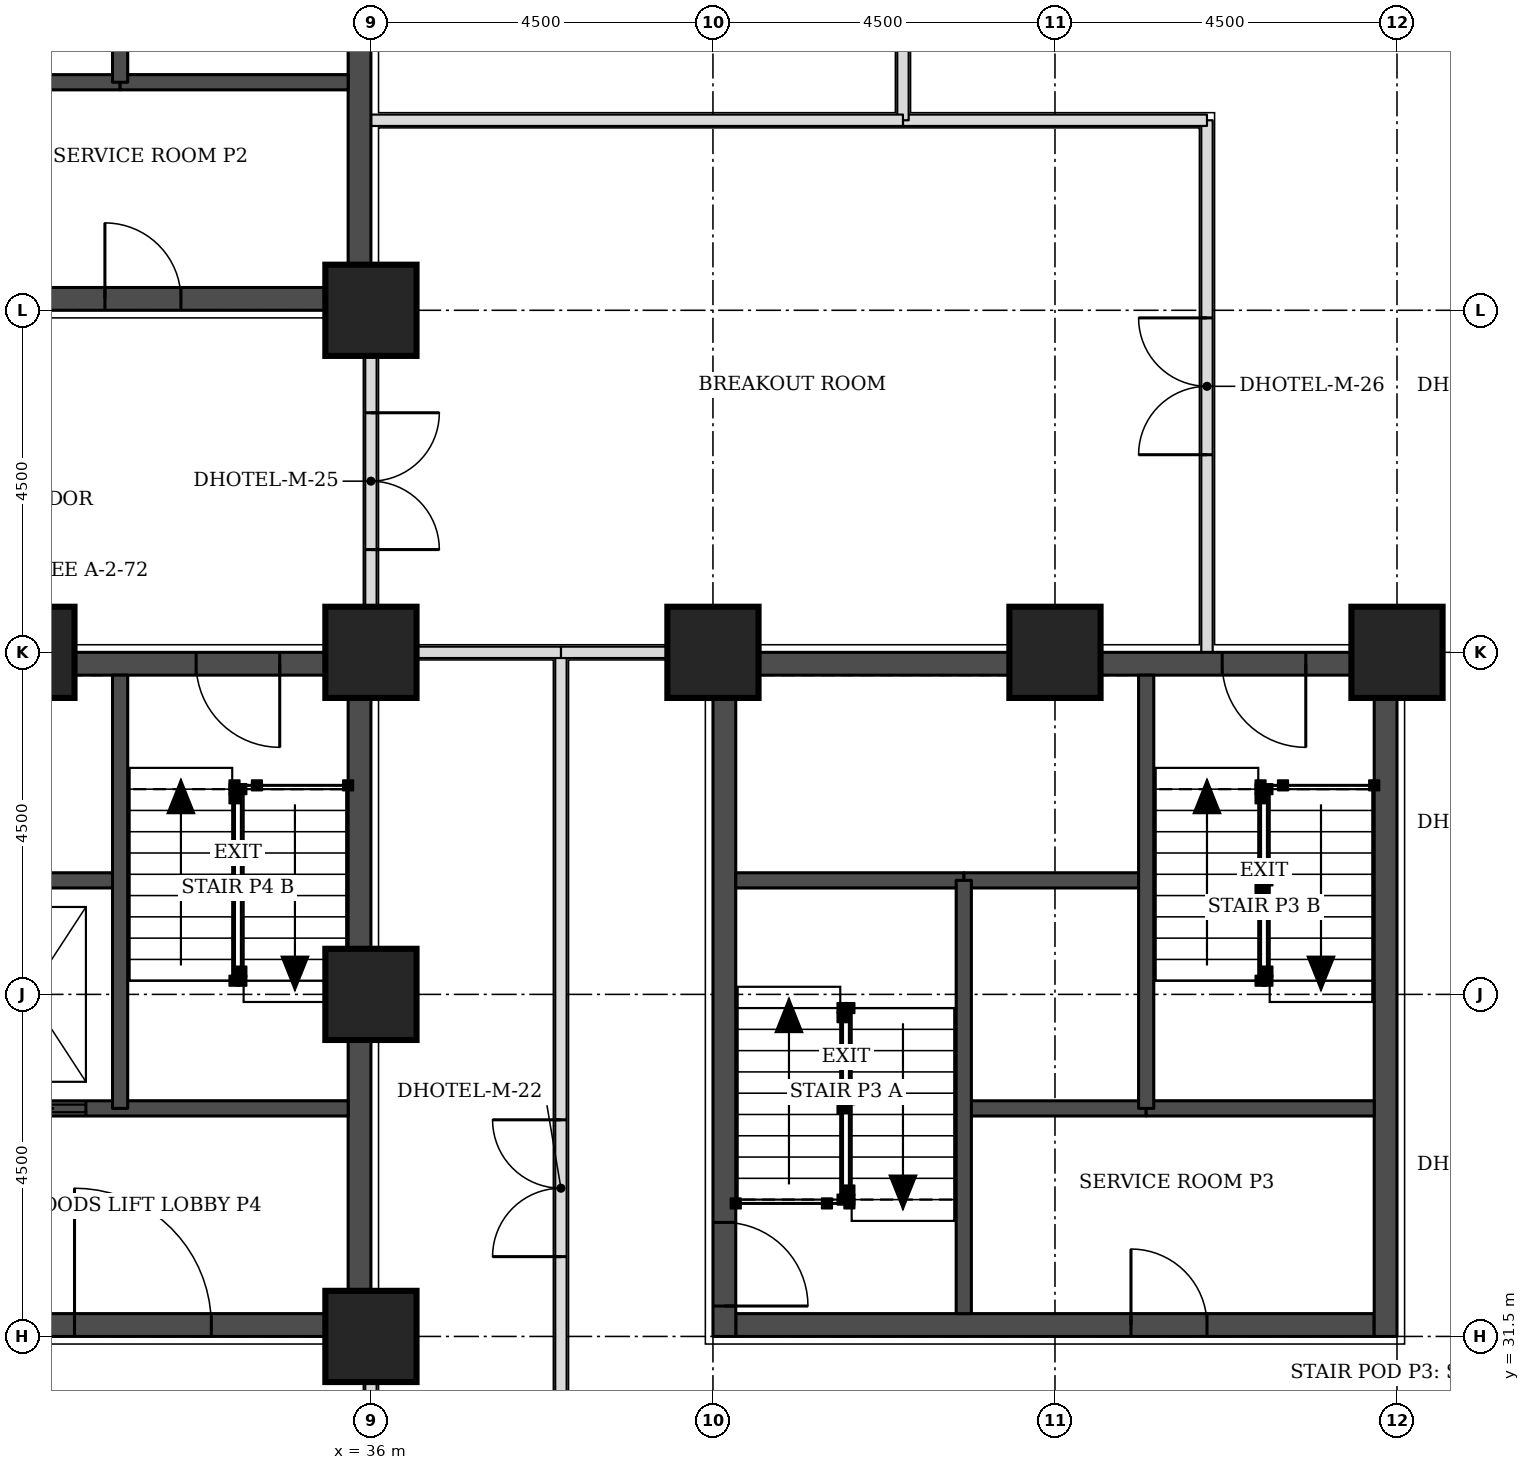
"""IFC4 building model, lengths in metres.
Left out: names, types, materials, properties, quantities, classifications, styles, units other than length and angle.
Written with IfcOpenShell. Run it as: python <this file> out.ifc"""

import sys

from ifc_helpers import new_model, si_unit, direction, frame, frame_2d, origin, origin_2d, place, context, subcontext, project, spatial, rectangle, extrude, element, fill, save


model = new_model("IFC4")
c1 = context("Model", 3, precision=1e-05, world=origin(), true_north=direction((0.0, 1.0)))
c2 = subcontext(c1, "Body", "Model", "MODEL_VIEW")
j1 = project(units=[si_unit("LENGTHUNIT", "METRE"), si_unit("PLANEANGLEUNIT", "RADIAN")], contexts=[c1])
p1 = place(None, origin())
s1 = spatial("IfcSite", under=j1, at=p1, CompositionType="ELEMENT")
p2 = place(p1, origin())
s2 = spatial("IfcBuilding", under=s1, at=p2, CompositionType="ELEMENT")
p3 = place(p2, frame((0.0, 0.0, 23.1)))
s3 = spatial("IfcBuildingStorey", under=s2, at=p3, CompositionType="ELEMENT", Elevation=23.1)
for number, where, z_axis, x_axis in (
    (1, (36.0, 31.5, 0.0), (0.0, 0.0, 1.0), (1.0, 0.0, 0.0)),
    (2, (36.0, 36.0, 0.0), (0.0, 0.0, 1.0), (1.0, 0.0, 0.0)),
    (3, (31.5, 40.5, 0.0), (0.0, 0.0, 1.0), (1.0, 0.0, 0.0)),
    (4, (36.0, 40.5, 0.0), (0.0, 0.0, 1.0), (1.0, 0.0, 0.0)),
    (5, (40.5, 40.5, 0.0), (0.0, 0.0, 1.0), (1.0, 0.0, 0.0)),
    (6, (45.0, 40.5, 0.0), (0.0, 0.0, 1.0), (1.0, 0.0, 0.0)),
    (7, (49.5, 40.5, 0.0), (0.0, 0.0, 1.0), (1.0, 0.0, 0.0)),
    (8, (36.0, 45.0, 0.0), (0.0, 0.0, 1.0), (1.0, 0.0, 0.0)),
):
    element("IfcColumn", number, at=place(p3, frame(where, z_axis=z_axis, x_axis=x_axis)), inside=s3, PredefinedType="COLUMN", context=c2, shape_type="SweptSolid", body=[
        extrude(rectangle(XDim=1.2, YDim=1.2, at=origin_2d()), origin(), (0.0, 0.0, 1.0), 3.3),
    ])
p4 = place(p3, frame((27.3, 45.15, 0.0), z_axis=(0.0, 0.0, 1.0), x_axis=(1.0, 0.0, 0.0)))
e9 = element("IfcWall", 9, at=p4, inside=s3, PredefinedType="SHEAR", context=c2, shape_type="SweptSolid", body=[
    extrude(rectangle(XDim=8.4, YDim=0.3, at=frame_2d((4.2, 0.0))), origin(), (0.0, 0.0, 1.0), 3.3),
])
p5 = place(p4, frame((5.2, 0.0, 0.0)))
e10 = element("IfcOpeningElement", 10, at=p5, cuts=e9, PredefinedType="OPENING", context=c2, shape_type="SweptSolid", body=[
    extrude(rectangle(XDim=1.0, YDim=2.1, at=frame_2d((0.5, 1.05))), frame((0.0, 0.16, 0.0), z_axis=(0.0, -1.0, 0.0), x_axis=(1.0, 0.0, 0.0)), (0.0, 0.0, 1.0), 0.32),
])
p6 = place(p3, frame((35.85, 45.0, 0.0), z_axis=(0.0, 0.0, 1.0), x_axis=(0.0, 1.0, 0.0)))
e11 = element("IfcWall", 11, at=p6, inside=s3, PredefinedType="SHEAR", context=c2, shape_type="SweptSolid", body=[
    extrude(rectangle(XDim=9.0, YDim=0.3, at=frame_2d((4.5, 0.0))), origin(), (0.0, 0.0, 1.0), 3.3),
])
p7 = place(p3, frame((40.8, 31.65, 0.0), z_axis=(0.0, 0.0, 1.0), x_axis=(1.0, 0.0, 0.0)))
e12 = element("IfcWall", 12, at=p7, inside=s3, PredefinedType="SHEAR", context=c2, shape_type="SweptSolid", body=[
    extrude(rectangle(XDim=8.4, YDim=0.3, at=frame_2d((4.2, 0.0))), origin(), (0.0, 0.0, 1.0), 3.3),
])
p8 = place(p7, frame((5.2, 0.0, 0.0)))
e13 = element("IfcOpeningElement", 13, at=p8, cuts=e12, PredefinedType="OPENING", context=c2, shape_type="SweptSolid", body=[
    extrude(rectangle(XDim=1.0, YDim=2.1, at=frame_2d((0.5, 1.05))), frame((0.0, 0.16, 0.0), z_axis=(0.0, -1.0, 0.0), x_axis=(1.0, 0.0, 0.0)), (0.0, 0.0, 1.0), 0.32),
])
p9 = place(p3, frame((40.8, 40.35, 0.0), z_axis=(0.0, 0.0, 1.0), x_axis=(1.0, 0.0, 0.0)))
e14 = element("IfcWall", 14, at=p9, inside=s3, PredefinedType="SHEAR", context=c2, shape_type="SweptSolid", body=[
    extrude(rectangle(XDim=8.4, YDim=0.3, at=frame_2d((4.2, 0.0))), origin(), (0.0, 0.0, 1.0), 3.3),
])
p10 = place(p9, frame((6.4, 0.0, 0.0)))
e15 = element("IfcOpeningElement", 15, at=p10, cuts=e14, PredefinedType="OPENING", context=c2, shape_type="SweptSolid", body=[
    extrude(rectangle(XDim=1.1, YDim=2.1, at=frame_2d((0.55, 1.05))), frame((0.0, 0.16, 0.0), z_axis=(0.0, -1.0, 0.0), x_axis=(1.0, 0.0, 0.0)), (0.0, 0.0, 1.0), 0.32),
])
p11 = place(p3, frame((40.65, 31.5, 0.0), z_axis=(0.0, 0.0, 1.0), x_axis=(0.0, 1.0, 0.0)))
e16 = element("IfcWall", 16, at=p11, inside=s3, PredefinedType="SHEAR", context=c2, shape_type="SweptSolid", body=[
    extrude(rectangle(XDim=9.0, YDim=0.3, at=frame_2d((4.5, 0.0))), origin(), (0.0, 0.0, 1.0), 3.3),
])
p12 = place(p11, frame((0.4, 0.0, 0.0)))
e17 = element("IfcOpeningElement", 17, at=p12, cuts=e16, PredefinedType="OPENING", context=c2, shape_type="SweptSolid", body=[
    extrude(rectangle(XDim=1.1, YDim=2.1, at=frame_2d((0.55, 1.05))), frame((0.0, 0.16, 0.0), z_axis=(0.0, -1.0, 0.0), x_axis=(1.0, 0.0, 0.0)), (0.0, 0.0, 1.0), 0.32),
])
p13 = place(p3, frame((49.35, 31.5, 0.0), z_axis=(0.0, 0.0, 1.0), x_axis=(0.0, 1.0, 0.0)))
e18 = element("IfcWall", 18, at=p13, inside=s3, PredefinedType="SHEAR", context=c2, shape_type="SweptSolid", body=[
    extrude(rectangle(XDim=9.0, YDim=0.3, at=frame_2d((4.5, 0.0))), origin(), (0.0, 0.0, 1.0), 3.3),
])
p14 = place(p3, frame((27.3, 31.65, 0.0), z_axis=(0.0, 0.0, 1.0), x_axis=(1.0, 0.0, 0.0)))
e19 = element("IfcWall", 19, at=p14, inside=s3, PredefinedType="SHEAR", context=c2, shape_type="SweptSolid", body=[
    extrude(rectangle(XDim=8.4, YDim=0.3, at=frame_2d((4.2, 0.0))), origin(), (0.0, 0.0, 1.0), 3.3),
])
p15 = place(p14, frame((4.8, 0.0, 0.0)))
e20 = element("IfcOpeningElement", 20, at=p15, cuts=e19, PredefinedType="OPENING", context=c2, shape_type="SweptSolid", body=[
    extrude(rectangle(XDim=1.8, YDim=2.1, at=frame_2d((0.9, 1.05))), frame((0.0, 0.16, 0.0), z_axis=(0.0, -1.0, 0.0), x_axis=(1.0, 0.0, 0.0)), (0.0, 0.0, 1.0), 0.32),
])
p16 = place(p3, frame((27.3, 40.35, 0.0), z_axis=(0.0, 0.0, 1.0), x_axis=(1.0, 0.0, 0.0)))
e21 = element("IfcWall", 21, at=p16, inside=s3, PredefinedType="SHEAR", context=c2, shape_type="SweptSolid", body=[
    extrude(rectangle(XDim=8.4, YDim=0.3, at=frame_2d((4.2, 0.0))), origin(), (0.0, 0.0, 1.0), 3.3),
])
p17 = place(p16, frame((6.4, 0.0, 0.0)))
e22 = element("IfcOpeningElement", 22, at=p17, cuts=e21, PredefinedType="OPENING", context=c2, shape_type="SweptSolid", body=[
    extrude(rectangle(XDim=1.1, YDim=2.1, at=frame_2d((0.55, 1.05))), frame((0.0, 0.16, 0.0), z_axis=(0.0, -1.0, 0.0), x_axis=(1.0, 0.0, 0.0)), (0.0, 0.0, 1.0), 0.32),
])
p18 = place(p3, frame((35.85, 31.5, 0.0), z_axis=(0.0, 0.0, 1.0), x_axis=(0.0, 1.0, 0.0)))
e23 = element("IfcWall", 23, at=p18, inside=s3, PredefinedType="SHEAR", context=c2, shape_type="SweptSolid", body=[
    extrude(rectangle(XDim=9.0, YDim=0.3, at=frame_2d((4.5, 0.0))), origin(), (0.0, 0.0, 1.0), 3.3),
])
p19 = place(p3, frame((38.5, 26.4, 0.0), z_axis=(0.0, 0.0, 1.0), x_axis=(0.0, 1.0, 0.0)))
e24 = element("IfcWall", 24, at=p19, inside=s3, PredefinedType="PARTITIONING", context=c2, shape_type="SweptSolid", body=[
    extrude(rectangle(XDim=14.1, YDim=0.15, at=frame_2d((7.05, 0.0))), origin(), (0.0, 0.0, 1.0), 3.08),
])
p20 = place(p19, frame((6.15, 0.0, 0.0)))
e25 = element("IfcOpeningElement", 25, at=p20, cuts=e24, PredefinedType="OPENING", context=c2, shape_type="SweptSolid", body=[
    extrude(rectangle(XDim=1.8, YDim=2.1, at=frame_2d((0.9, 1.05))), frame((0.0, 0.085, 0.0), z_axis=(0.0, -1.0, 0.0), x_axis=(1.0, 0.0, 0.0)), (0.0, 0.0, 1.0), 0.17),
])
for number, where, z_axis, x_axis in (
    (26, (36.0, 29.5, 0.0), (0.0, 0.0, 1.0), (0.0, 1.0, 0.0)),
    (27, (38.5, 40.5, 0.0), (0.0, 0.0, 1.0), (1.0, 0.0, 0.0)),
):
    element("IfcWall", number, at=place(p3, frame(where, z_axis=z_axis, x_axis=x_axis)), inside=s3, PredefinedType="PARTITIONING", context=c2, shape_type="SweptSolid", body=[
        extrude(rectangle(XDim=1.95, YDim=0.15, at=frame_2d((0.975, 0.0))), origin(), (0.0, 0.0, 1.0), 2.33),
    ])
p21 = place(p3, frame((36.0, 40.55, 0.0), z_axis=(0.0, 0.0, 1.0), x_axis=(0.0, 1.0, 0.0)))
e28 = element("IfcWall", 28, at=p21, inside=s3, PredefinedType="PARTITIONING", context=c2, shape_type="SweptSolid", body=[
    extrude(rectangle(XDim=4.4, YDim=0.15, at=frame_2d((2.2, 0.0))), origin(), (0.0, 0.0, 1.0), 2.33),
])
p22 = place(p21, frame((1.302, 0.0, 0.0)))
e29 = element("IfcOpeningElement", 29, at=p22, cuts=e28, PredefinedType="OPENING", context=c2, shape_type="SweptSolid", body=[
    extrude(rectangle(XDim=1.8, YDim=2.1, at=frame_2d((0.9, 1.05))), frame((0.0, 0.085, 0.0), z_axis=(0.0, -1.0, 0.0), x_axis=(1.0, 0.0, 0.0)), (0.0, 0.0, 1.0), 0.17),
])
p23 = place(p3, frame((47.0, 40.5, 0.0), z_axis=(0.0, 0.0, 1.0), x_axis=(0.0, 1.0, 0.0)))
e30 = element("IfcWall", 30, at=p23, inside=s3, PredefinedType="PARTITIONING", context=c2, shape_type="SweptSolid", body=[
    extrude(rectangle(XDim=7.0, YDim=0.15, at=frame_2d((3.5, 0.0))), origin(), (0.0, 0.0, 1.0), 3.08),
])
p24 = place(p23, frame((2.6, 0.0, 0.0)))
e31 = element("IfcOpeningElement", 31, at=p24, cuts=e30, PredefinedType="OPENING", context=c2, shape_type="SweptSolid", body=[
    extrude(rectangle(XDim=1.8, YDim=2.1, at=frame_2d((0.9, 1.05))), frame((0.0, 0.085, 0.0), z_axis=(0.0, -1.0, 0.0), x_axis=(1.0, 0.0, 0.0)), (0.0, 0.0, 1.0), 0.17),
])
p25 = place(p3, frame((43.0, 47.5, 0.0), z_axis=(0.0, 0.0, 1.0), x_axis=(1.0, 0.0, 0.0)))
e32 = element("IfcWall", 32, at=p25, inside=s3, PredefinedType="PARTITIONING", context=c2, shape_type="SweptSolid", body=[
    extrude(rectangle(XDim=4.0, YDim=0.15, at=frame_2d((2.0, 0.0))), origin(), (0.0, 0.0, 1.0), 3.08),
])
p26 = place(p3, frame((43.0, 47.5, 0.0), z_axis=(0.0, 0.0, 1.0), x_axis=(0.0, 1.0, 0.0)))
e33 = element("IfcWall", 33, at=p26, inside=s3, PredefinedType="PARTITIONING", context=c2, shape_type="SweptSolid", body=[
    extrude(rectangle(XDim=7.1, YDim=0.15, at=frame_2d((3.55, 0.0))), origin(), (0.0, 0.0, 1.0), 3.08),
])
p27 = place(p26, frame((3.1, 0.0, 0.0)))
e34 = element("IfcOpeningElement", 34, at=p27, cuts=e33, PredefinedType="OPENING", context=c2, shape_type="SweptSolid", body=[
    extrude(rectangle(XDim=0.9, YDim=2.1, at=frame_2d((0.45, 1.05))), frame((0.0, 0.085, 0.0), z_axis=(0.0, -1.0, 0.0), x_axis=(1.0, 0.0, 0.0)), (0.0, 0.0, 1.0), 0.17),
])
p28 = place(p3, frame((36.05, 40.5, 0.0), z_axis=(0.0, 0.0, 1.0), x_axis=(1.0, 0.0, 0.0)))
e35 = element("IfcWall", 35, at=p28, inside=s3, PredefinedType="PARTITIONING", context=c2, shape_type="SweptSolid", body=[
    extrude(rectangle(XDim=2.45, YDim=0.15, at=frame_2d((1.225, 0.0))), origin(), (0.0, 0.0, 1.0), 2.33),
])
p29 = place(p3, frame((36.0, 47.5, 0.0), z_axis=(0.0, 0.0, 1.0), x_axis=(1.0, 0.0, 0.0)))
e36 = element("IfcWall", 36, at=p29, inside=s3, PredefinedType="PARTITIONING", context=c2, shape_type="SweptSolid", body=[
    extrude(rectangle(XDim=7.0, YDim=0.15, at=frame_2d((3.5, 0.0))), origin(), (0.0, 0.0, 1.0), 3.08),
])
p30 = place(p3, frame((30.3, 48.0, 0.0), z_axis=(0.0, 0.0, 1.0), x_axis=(1.0, 0.0, 0.0)))
e37 = element("IfcWall", 37, at=p30, inside=s3, PredefinedType="SOLIDWALL", context=c2, shape_type="SweptSolid", body=[
    extrude(rectangle(XDim=2.4, YDim=0.2, at=frame_2d((1.2, 0.0))), origin(), (0.0, 0.0, 1.0), 3.08),
])
p31 = place(p3, frame((32.7, 48.0, 0.0), z_axis=(0.0, 0.0, 1.0), x_axis=(1.0, 0.0, 0.0)))
e38 = element("IfcWall", 38, at=p31, inside=s3, PredefinedType="SOLIDWALL", context=c2, shape_type="SweptSolid", body=[
    extrude(rectangle(XDim=3.0, YDim=0.2, at=frame_2d((1.5, 0.0))), origin(), (0.0, 0.0, 1.0), 3.08),
])
p32 = place(p3, frame((32.7, 48.0, 0.0), z_axis=(0.0, 0.0, 1.0), x_axis=(0.0, 1.0, 0.0)))
e39 = element("IfcWall", 39, at=p32, inside=s3, PredefinedType="SOLIDWALL", context=c2, shape_type="SweptSolid", body=[
    extrude(rectangle(XDim=5.7, YDim=0.2, at=frame_2d((2.85, 0.0))), origin(), (0.0, 0.0, 1.0), 3.08),
])
p33 = place(p3, frame((43.8, 34.5, 0.0), z_axis=(0.0, 0.0, 1.0), x_axis=(1.0, 0.0, 0.0)))
e40 = element("IfcWall", 40, at=p33, inside=s3, PredefinedType="SOLIDWALL", context=c2, shape_type="SweptSolid", body=[
    extrude(rectangle(XDim=2.4, YDim=0.2, at=frame_2d((1.2, 0.0))), origin(), (0.0, 0.0, 1.0), 3.08),
])
p34 = place(p3, frame((46.2, 34.5, 0.0), z_axis=(0.0, 0.0, 1.0), x_axis=(1.0, 0.0, 0.0)))
e41 = element("IfcWall", 41, at=p34, inside=s3, PredefinedType="SOLIDWALL", context=c2, shape_type="SweptSolid", body=[
    extrude(rectangle(XDim=3.0, YDim=0.2, at=frame_2d((1.5, 0.0))), origin(), (0.0, 0.0, 1.0), 3.08),
])
p35 = place(p3, frame((43.8, 37.5, 0.0), z_axis=(0.0, 0.0, 1.0), x_axis=(1.0, 0.0, 0.0)))
e42 = element("IfcWall", 42, at=p35, inside=s3, PredefinedType="SOLIDWALL", context=c2, shape_type="SweptSolid", body=[
    extrude(rectangle(XDim=2.4, YDim=0.2, at=frame_2d((1.2, 0.0))), origin(), (0.0, 0.0, 1.0), 3.3),
])
p36 = place(p3, frame((40.8, 37.5, 0.0), z_axis=(0.0, 0.0, 1.0), x_axis=(1.0, 0.0, 0.0)))
e43 = element("IfcWall", 43, at=p36, inside=s3, PredefinedType="SOLIDWALL", context=c2, shape_type="SweptSolid", body=[
    extrude(rectangle(XDim=3.0, YDim=0.2, at=frame_2d((1.5, 0.0))), origin(), (0.0, 0.0, 1.0), 3.08),
])
for number, where, z_axis, x_axis in (
    (44, (43.8, 31.8, 0.0), (0.0, 0.0, 1.0), (0.0, 1.0, 0.0)),
    (45, (46.2, 34.5, 0.0), (0.0, 0.0, 1.0), (0.0, 1.0, 0.0)),
):
    element("IfcWall", number, at=place(p3, frame(where, z_axis=z_axis, x_axis=x_axis)), inside=s3, PredefinedType="SOLIDWALL", context=c2, shape_type="SweptSolid", body=[
        extrude(rectangle(XDim=5.7, YDim=0.2, at=frame_2d((2.85, 0.0))), origin(), (0.0, 0.0, 1.0), 3.08),
    ])
p37 = place(p3, frame((30.3, 34.5, 0.0), z_axis=(0.0, 0.0, 1.0), x_axis=(1.0, 0.0, 0.0)))
e46 = element("IfcWall", 46, at=p37, inside=s3, PredefinedType="SOLIDWALL", context=c2, shape_type="SweptSolid", body=[
    extrude(rectangle(XDim=5.4, YDim=0.2, at=frame_2d((2.7, 0.0))), origin(), (0.0, 0.0, 1.0), 3.08),
])
p38 = place(p37, frame((0.45, 0.0, 0.0)))
e47 = element("IfcOpeningElement", 47, at=p38, cuts=e46, PredefinedType="OPENING", context=c2, shape_type="SweptSolid", body=[
    extrude(rectangle(XDim=1.5, YDim=2.1, at=frame_2d((0.75, 1.05))), frame((0.0, 0.11, 0.0), z_axis=(0.0, -1.0, 0.0), x_axis=(1.0, 0.0, 0.0)), (0.0, 0.0, 1.0), 0.22),
])
p39 = place(p3, frame((27.3, 37.5, 0.0), z_axis=(0.0, 0.0, 1.0), x_axis=(1.0, 0.0, 0.0)))
e48 = element("IfcWall", 48, at=p39, inside=s3, PredefinedType="SOLIDWALL", context=c2, shape_type="SweptSolid", body=[
    extrude(rectangle(XDim=5.4, YDim=0.2, at=frame_2d((2.7, 0.0))), origin(), (0.0, 0.0, 1.0), 3.08),
])
p40 = place(p3, frame((32.7, 34.5, 0.0), z_axis=(0.0, 0.0, 1.0), x_axis=(0.0, 1.0, 0.0)))
e49 = element("IfcWall", 49, at=p40, inside=s3, PredefinedType="SOLIDWALL", context=c2, shape_type="SweptSolid", body=[
    extrude(rectangle(XDim=5.7, YDim=0.2, at=frame_2d((2.85, 0.0))), origin(), (0.0, 0.0, 1.0), 3.08),
])
p41 = place(p20, origin())
e50 = element("IfcDoor", 50, at=p41, inside=s3, OperationType="DOUBLE_DOOR_SINGLE_SWING", PredefinedType="DOOR", context=c2, shape_type="SweptSolid", body=[
    extrude(rectangle(XDim=1.8, YDim=2.1, at=frame_2d((0.9, 1.05))), frame((0.0, 0.025, 0.0), z_axis=(0.0, -1.0, 0.0), x_axis=(1.0, 0.0, 0.0)), (0.0, 0.0, 1.0), 0.05),
])
fill(e25, e50)
p42 = place(p24, origin())
e51 = element("IfcDoor", 51, at=p42, inside=s3, OperationType="DOUBLE_DOOR_SINGLE_SWING", PredefinedType="DOOR", context=c2, shape_type="SweptSolid", body=[
    extrude(rectangle(XDim=1.8, YDim=2.1, at=frame_2d((0.9, 1.05))), frame((0.0, 0.025, 0.0), z_axis=(0.0, -1.0, 0.0), x_axis=(1.0, 0.0, 0.0)), (0.0, 0.0, 1.0), 0.05),
])
fill(e31, e51)
p43 = place(p22, frame((1.8, 0.0, 0.0), z_axis=(0.0, 0.0, 1.0), x_axis=(-1.0, 0.0, 0.0)))
e52 = element("IfcDoor", 52, at=p43, inside=s3, OperationType="DOUBLE_DOOR_SINGLE_SWING", PredefinedType="DOOR", context=c2, shape_type="SweptSolid", body=[
    extrude(rectangle(XDim=1.8, YDim=2.1, at=frame_2d((0.9, 1.05))), frame((0.0, 0.025, 0.0), z_axis=(0.0, -1.0, 0.0), x_axis=(1.0, 0.0, 0.0)), (0.0, 0.0, 1.0), 0.05),
])
fill(e29, e52)
p44 = place(p5, origin())
e53 = element("IfcDoor", 53, at=p44, inside=s3, OperationType="SINGLE_SWING_LEFT", PredefinedType="DOOR", context=c2, shape_type="SweptSolid", body=[
    extrude(rectangle(XDim=1.0, YDim=2.1, at=frame_2d((0.5, 1.05))), frame((0.0, 0.025, 0.0), z_axis=(0.0, -1.0, 0.0), x_axis=(1.0, 0.0, 0.0)), (0.0, 0.0, 1.0), 0.05),
])
fill(e10, e53)
p45 = place(p12, frame((1.1, 0.0, 0.0), z_axis=(0.0, 0.0, 1.0), x_axis=(-1.0, 0.0, 0.0)))
e54 = element("IfcDoor", 54, at=p45, inside=s3, OperationType="SINGLE_SWING_RIGHT", PredefinedType="DOOR", context=c2, shape_type="SweptSolid", body=[
    extrude(rectangle(XDim=1.1, YDim=2.1, at=frame_2d((0.55, 1.05))), frame((0.0, 0.025, 0.0), z_axis=(0.0, -1.0, 0.0), x_axis=(1.0, 0.0, 0.0)), (0.0, 0.0, 1.0), 0.05),
])
fill(e17, e54)
p46 = place(p10, frame((1.1, 0.0, 0.0), z_axis=(0.0, 0.0, 1.0), x_axis=(-1.0, 0.0, 0.0)))
e55 = element("IfcDoor", 55, at=p46, inside=s3, OperationType="SINGLE_SWING_LEFT", PredefinedType="DOOR", context=c2, shape_type="SweptSolid", body=[
    extrude(rectangle(XDim=1.1, YDim=2.1, at=frame_2d((0.55, 1.05))), frame((0.0, 0.025, 0.0), z_axis=(0.0, -1.0, 0.0), x_axis=(1.0, 0.0, 0.0)), (0.0, 0.0, 1.0), 0.05),
])
fill(e15, e55)
p47 = place(p8, origin())
e56 = element("IfcDoor", 56, at=p47, inside=s3, OperationType="SINGLE_SWING_LEFT", PredefinedType="DOOR", context=c2, shape_type="SweptSolid", body=[
    extrude(rectangle(XDim=1.0, YDim=2.1, at=frame_2d((0.5, 1.05))), frame((0.0, 0.025, 0.0), z_axis=(0.0, -1.0, 0.0), x_axis=(1.0, 0.0, 0.0)), (0.0, 0.0, 1.0), 0.05),
])
fill(e13, e56)
p48 = place(p17, frame((1.1, 0.0, 0.0), z_axis=(0.0, 0.0, 1.0), x_axis=(-1.0, 0.0, 0.0)))
e57 = element("IfcDoor", 57, at=p48, inside=s3, OperationType="SINGLE_SWING_LEFT", PredefinedType="DOOR", context=c2, shape_type="SweptSolid", body=[
    extrude(rectangle(XDim=1.1, YDim=2.1, at=frame_2d((0.55, 1.05))), frame((0.0, 0.025, 0.0), z_axis=(0.0, -1.0, 0.0), x_axis=(1.0, 0.0, 0.0)), (0.0, 0.0, 1.0), 0.05),
])
fill(e22, e57)
p49 = place(p38, origin())
e58 = element("IfcDoor", 58, at=p49, inside=s3, OperationType="DOUBLE_DOOR_SLIDING", PredefinedType="DOOR", context=c2, shape_type="SweptSolid", body=[
    extrude(rectangle(XDim=1.5, YDim=2.1, at=frame_2d((0.75, 1.05))), frame((0.0, 0.025, 0.0), z_axis=(0.0, -1.0, 0.0), x_axis=(1.0, 0.0, 0.0)), (0.0, 0.0, 1.0), 0.05),
])
fill(e47, e58)
p50 = place(p15, origin())
e59 = element("IfcDoor", 59, at=p50, inside=s3, OperationType="SINGLE_SWING_LEFT", PredefinedType="DOOR", context=c2, shape_type="SweptSolid", body=[
    extrude(rectangle(XDim=1.8, YDim=2.1, at=frame_2d((0.9, 1.05))), frame((0.0, 0.025, 0.0), z_axis=(0.0, -1.0, 0.0), x_axis=(1.0, 0.0, 0.0)), (0.0, 0.0, 1.0), 0.05),
])
fill(e20, e59)
save(model, sys.argv[1])
